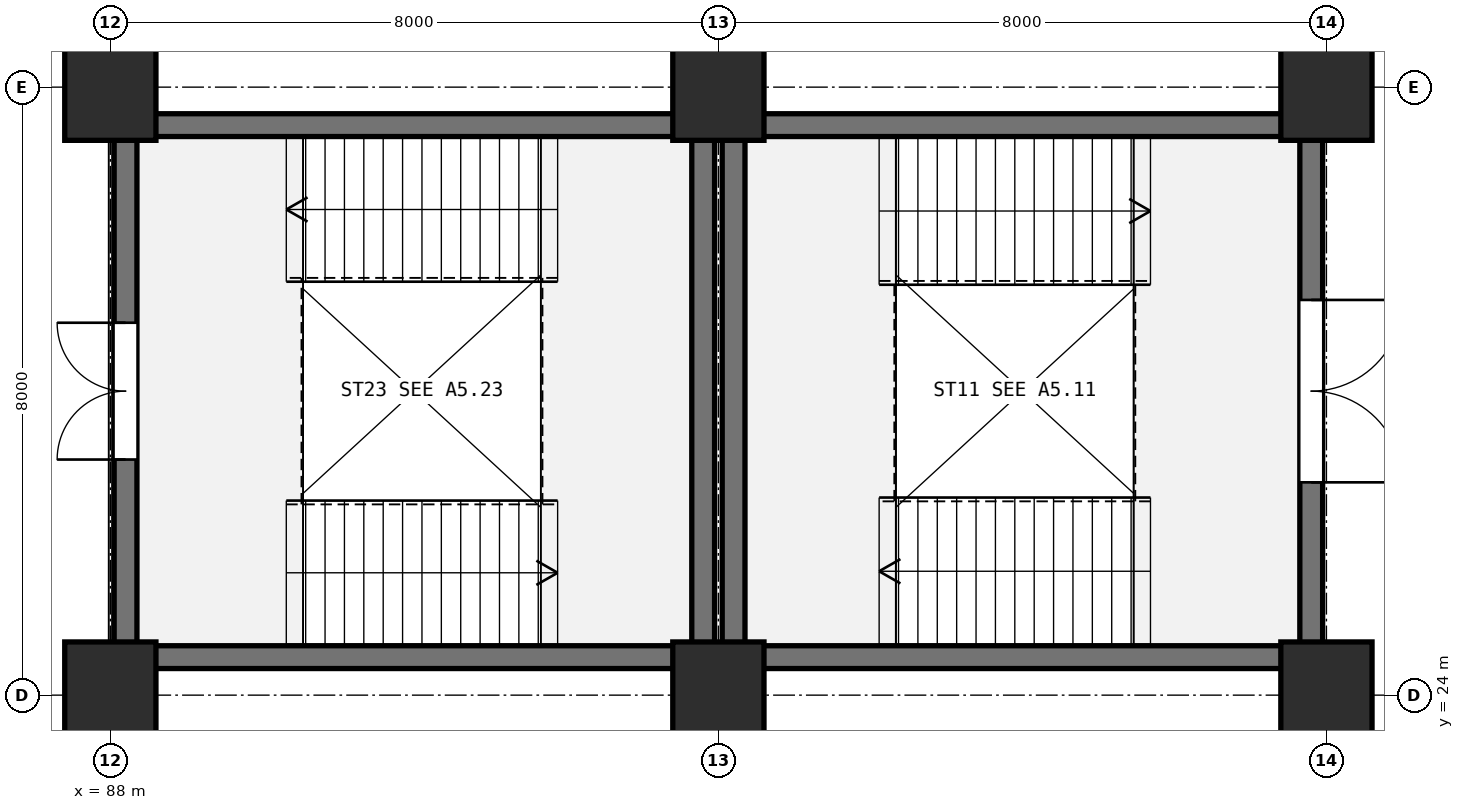
"""IFC4 building model, lengths in metres.
Left out: names, types, materials, properties, quantities, classifications, styles, units other than length and angle.
Written with IfcOpenShell. Run it as: python <this file> out.ifc"""

import sys

from ifc_helpers import new_model, si_unit, direction, frame, frame_2d, origin, origin_2d, place, context, subcontext, project, spatial, rectangle, extrude, element, fill, save


model = new_model("IFC4")
c1 = context("Model", 3, precision=1e-05, world=origin(), true_north=direction((0.0, 1.0)))
c2 = subcontext(c1, "Body", "Model", "MODEL_VIEW")
j1 = project(units=[si_unit("LENGTHUNIT", "METRE"), si_unit("PLANEANGLEUNIT", "RADIAN")], contexts=[c1])
p1 = place(None, origin())
s1 = spatial("IfcSite", under=j1, at=p1, CompositionType="ELEMENT")
p2 = place(p1, origin())
s2 = spatial("IfcBuilding", under=s1, at=p2, CompositionType="ELEMENT")
p3 = place(p2, origin())
s3 = spatial("IfcBuildingStorey", under=s2, at=p3, CompositionType="ELEMENT", Elevation=0.0)
for number, where, z_axis, x_axis in (
    (1, (88.0, 24.0, 0.0), (0.0, 0.0, 1.0), (1.0, 0.0, 0.0)),
    (2, (88.0, 32.0, 0.0), (0.0, 0.0, 1.0), (1.0, 0.0, 0.0)),
    (3, (96.0, 24.0, 0.0), (0.0, 0.0, 1.0), (1.0, 0.0, 0.0)),
    (4, (96.0, 32.0, 0.0), (0.0, 0.0, 1.0), (1.0, 0.0, 0.0)),
    (5, (104.0, 24.0, 0.0), (0.0, 0.0, 1.0), (1.0, 0.0, 0.0)),
    (6, (104.0, 32.0, 0.0), (0.0, 0.0, 1.0), (1.0, 0.0, 0.0)),
):
    element("IfcColumn", number, at=place(p3, frame(where, z_axis=z_axis, x_axis=x_axis)), inside=s3, PredefinedType="COLUMN", context=c2, shape_type="SweptSolid", body=[
        extrude(rectangle(XDim=1.2, YDim=1.4, at=origin_2d()), origin(), (0.0, 0.0, 1.0), 5.4),
    ])
p4 = place(p3, frame((103.8, 24.5, 0.0), z_axis=(0.0, 0.0, 1.0), x_axis=(-1.0, 0.0, 0.0)))
e7 = element("IfcWall", 7, at=p4, inside=s3, PredefinedType="SHEAR", context=c2, shape_type="SweptSolid", body=[
    extrude(rectangle(XDim=7.6, YDim=0.3, at=frame_2d((3.8, 0.0))), origin(), (0.0, 0.0, 1.0), 5.08),
])
p5 = place(p3, frame((96.2, 24.5, 0.0), z_axis=(0.0, 0.0, 1.0), x_axis=(0.0, 1.0, 0.0)))
e8 = element("IfcWall", 8, at=p5, inside=s3, PredefinedType="SHEAR", context=c2, shape_type="SweptSolid", body=[
    extrude(rectangle(XDim=7.0, YDim=0.3, at=frame_2d((3.5, 0.0))), origin(), (0.0, 0.0, 1.0), 5.08),
])
p6 = place(p3, frame((96.2, 31.5, 0.0), z_axis=(0.0, 0.0, 1.0), x_axis=(1.0, 0.0, 0.0)))
e9 = element("IfcWall", 9, at=p6, inside=s3, PredefinedType="SHEAR", context=c2, shape_type="SweptSolid", body=[
    extrude(rectangle(XDim=7.6, YDim=0.3, at=frame_2d((3.8, 0.0))), origin(), (0.0, 0.0, 1.0), 5.08),
])
p7 = place(p3, frame((103.8, 31.5, 0.0), z_axis=(0.0, 0.0, 1.0), x_axis=(0.0, -1.0, 0.0)))
e10 = element("IfcWall", 10, at=p7, inside=s3, PredefinedType="SHEAR", context=c2, shape_type="SweptSolid", body=[
    extrude(rectangle(XDim=7.0, YDim=0.3, at=frame_2d((3.5, 0.0))), origin(), (0.0, 0.0, 1.0), 5.08),
])
p8 = place(p7, frame((2.3, 0.0, 0.0)))
e11 = element("IfcOpeningElement", 11, at=p8, cuts=e10, PredefinedType="OPENING", context=c2, shape_type="SweptSolid", body=[
    extrude(rectangle(XDim=2.4, YDim=2.2, at=frame_2d((1.2, 1.1))), frame((0.0, 0.16, 0.0), z_axis=(0.0, -1.0, 0.0), x_axis=(1.0, 0.0, 0.0)), (0.0, 0.0, 1.0), 0.32),
])
p9 = place(p3, frame((95.8, 24.5, 0.0), z_axis=(0.0, 0.0, 1.0), x_axis=(-1.0, 0.0, 0.0)))
e12 = element("IfcWall", 12, at=p9, inside=s3, PredefinedType="SHEAR", context=c2, shape_type="SweptSolid", body=[
    extrude(rectangle(XDim=7.6, YDim=0.3, at=frame_2d((3.8, 0.0))), origin(), (0.0, 0.0, 1.0), 5.08),
])
p10 = place(p3, frame((88.2, 24.5, 0.0), z_axis=(0.0, 0.0, 1.0), x_axis=(0.0, 1.0, 0.0)))
e13 = element("IfcWall", 13, at=p10, inside=s3, PredefinedType="SHEAR", context=c2, shape_type="SweptSolid", body=[
    extrude(rectangle(XDim=7.0, YDim=0.3, at=frame_2d((3.5, 0.0))), origin(), (0.0, 0.0, 1.0), 5.08),
])
p11 = place(p10, frame((2.6, 0.0, 0.0)))
e14 = element("IfcOpeningElement", 14, at=p11, cuts=e13, PredefinedType="OPENING", context=c2, shape_type="SweptSolid", body=[
    extrude(rectangle(XDim=1.8, YDim=2.2, at=frame_2d((0.9, 1.1))), frame((0.0, 0.16, 0.0), z_axis=(0.0, -1.0, 0.0), x_axis=(1.0, 0.0, 0.0)), (0.0, 0.0, 1.0), 0.32),
])
p12 = place(p3, frame((88.2, 31.5, 0.0), z_axis=(0.0, 0.0, 1.0), x_axis=(1.0, 0.0, 0.0)))
e15 = element("IfcWall", 15, at=p12, inside=s3, PredefinedType="SHEAR", context=c2, shape_type="SweptSolid", body=[
    extrude(rectangle(XDim=7.6, YDim=0.3, at=frame_2d((3.8, 0.0))), origin(), (0.0, 0.0, 1.0), 5.08),
])
p13 = place(p3, frame((95.8, 31.5, 0.0), z_axis=(0.0, 0.0, 1.0), x_axis=(0.0, -1.0, 0.0)))
e16 = element("IfcWall", 16, at=p13, inside=s3, PredefinedType="SHEAR", context=c2, shape_type="SweptSolid", body=[
    extrude(rectangle(XDim=7.0, YDim=0.3, at=frame_2d((3.5, 0.0))), origin(), (0.0, 0.0, 1.0), 5.08),
])
p14 = place(p8, origin())
e17 = element("IfcDoor", 17, at=p14, inside=s3, OperationType="DOUBLE_DOOR_SINGLE_SWING", PredefinedType="DOOR", context=c2, shape_type="SweptSolid", body=[
    extrude(rectangle(XDim=2.4, YDim=2.2, at=frame_2d((1.2, 1.1))), frame((0.0, 0.025, 0.0), z_axis=(0.0, -1.0, 0.0), x_axis=(1.0, 0.0, 0.0)), (0.0, 0.0, 1.0), 0.05),
])
fill(e11, e17)
p15 = place(p11, origin())
e18 = element("IfcDoor", 18, at=p15, inside=s3, OperationType="DOUBLE_DOOR_SINGLE_SWING", PredefinedType="DOOR", context=c2, shape_type="SweptSolid", body=[
    extrude(rectangle(XDim=1.8, YDim=2.2, at=frame_2d((0.9, 1.1))), frame((0.0, 0.025, 0.0), z_axis=(0.0, -1.0, 0.0), x_axis=(1.0, 0.0, 0.0)), (0.0, 0.0, 1.0), 0.05),
])
fill(e14, e18)
save(model, sys.argv[1])
